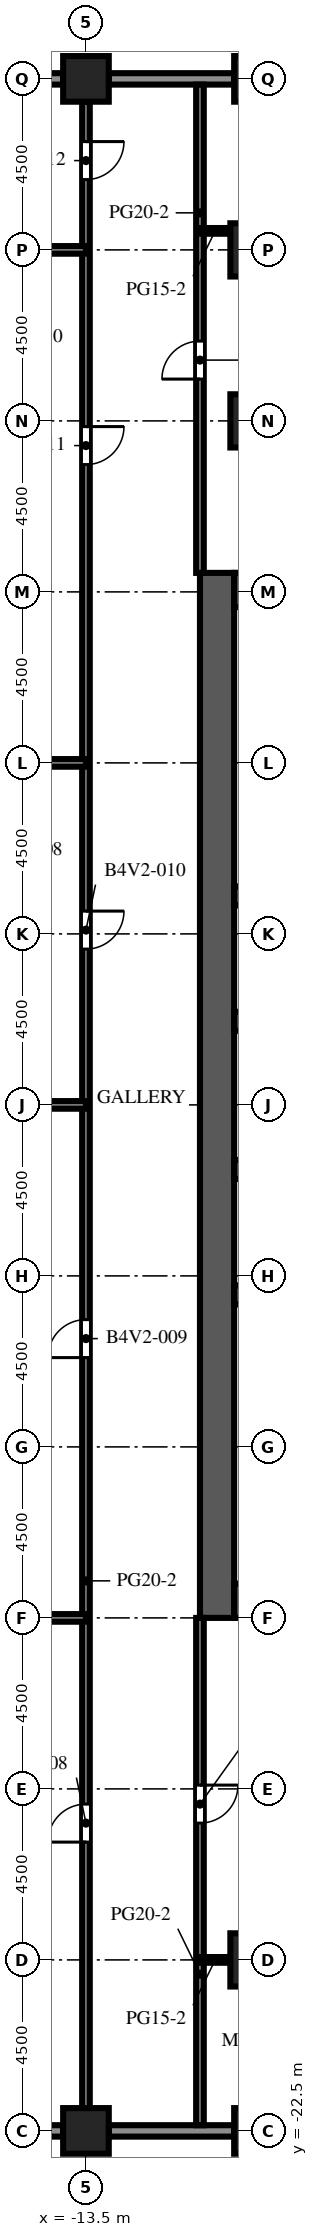
"""IFC4 building model, lengths in metres.
Left out: names, types, materials, properties, quantities, classifications, styles, units other than length and angle.
Written with IfcOpenShell. Run it as: python <this file> out.ifc"""

import sys

from ifc_helpers import new_model, si_unit, direction, frame, frame_2d, origin, origin_2d, place, context, subcontext, project, spatial, rectangle, extrude, element, fill, save


model = new_model("IFC4")
c1 = context("Model", 3, precision=1e-05, world=origin(), true_north=direction((0.0, 1.0)))
c2 = subcontext(c1, "Body", "Model", "MODEL_VIEW")
j1 = project(units=[si_unit("LENGTHUNIT", "METRE"), si_unit("PLANEANGLEUNIT", "RADIAN")], contexts=[c1])
p1 = place(None, origin())
s1 = spatial("IfcSite", under=j1, at=p1, CompositionType="ELEMENT")
p2 = place(p1, origin())
s2 = spatial("IfcBuilding", under=s1, at=p2, CompositionType="ELEMENT")
p3 = place(p2, frame((0.0, 0.0, 141.3)))
s3 = spatial("IfcBuildingStorey", under=s2, at=p3, CompositionType="ELEMENT", Elevation=141.3)
for number, where, z_axis, x_axis in (
    (1, (-13.5, -22.5, 0.0), (0.0, 0.0, 1.0), (1.0, 0.0, 0.0)),
    (2, (-13.5, 31.5, 0.0), (0.0, 0.0, 1.0), (1.0, 0.0, 0.0)),
    (3, (-9.0, -22.5, 0.0), (0.0, 0.0, 1.0), (1.0, 0.0, 0.0)),
    (4, (-9.0, 31.5, 0.0), (0.0, 0.0, 1.0), (1.0, 0.0, 0.0)),
):
    element("IfcColumn", number, at=place(p3, frame(where, z_axis=z_axis, x_axis=x_axis)), inside=s3, PredefinedType="COLUMN", context=c2, shape_type="SweptSolid", body=[
        extrude(rectangle(XDim=1.2, YDim=1.2, at=origin_2d()), origin(), (0.0, 0.0, 1.0), 4.1),
    ])
for number, where, z_axis, x_axis in (
    (5, (-9.0, -18.0, 0.0), (0.0, 0.0, 1.0), (1.0, 0.0, 0.0)),
    (6, (-9.0, 22.5, 0.0), (0.0, 0.0, 1.0), (1.0, 0.0, 0.0)),
    (7, (-9.0, 27.0, 0.0), (0.0, 0.0, 1.0), (1.0, 0.0, 0.0)),
):
    element("IfcColumn", number, at=place(p3, frame(where, z_axis=z_axis, x_axis=x_axis)), inside=s3, PredefinedType="COLUMN", context=c2, shape_type="SweptSolid", body=[
        extrude(rectangle(XDim=1.4, YDim=1.4, at=origin_2d()), origin(), (0.0, 0.0, 1.0), 4.1),
    ])
p4 = place(p3, frame((-10.05, -9.0, 0.0), z_axis=(0.0, 0.0, 1.0), x_axis=(0.0, 1.0, 0.0)))
e8 = element("IfcWall", 8, at=p4, inside=s3, PredefinedType="SHEAR", context=c2, shape_type="SweptSolid", body=[
    extrude(rectangle(XDim=27.5, YDim=0.9, at=frame_2d((13.75, 0.0))), origin(), (0.0, 0.0, 1.0), 4.1),
])
p5 = place(p4, frame((12.55, 0.0, 0.0)))
e9 = element("IfcOpeningElement", 9, at=p5, cuts=e8, PredefinedType="OPENING", context=c2, shape_type="SweptSolid", body=[
    extrude(rectangle(XDim=2.4, YDim=2.4, at=frame_2d((1.2, 1.2))), frame((0.0, 0.46, 0.0), z_axis=(0.0, -1.0, 0.0), x_axis=(1.0, 0.0, 0.0)), (0.0, 0.0, 1.0), 0.92),
])
p6 = place(p4, frame((6.825, 0.0, 0.0)))
e10 = element("IfcOpeningElement", 10, at=p6, cuts=e8, PredefinedType="OPENING", context=c2, shape_type="SweptSolid", body=[
    extrude(rectangle(XDim=1.2, YDim=2.1, at=frame_2d((0.6, 1.05))), frame((0.0, 0.46, 0.0), z_axis=(0.0, -1.0, 0.0), x_axis=(1.0, 0.0, 0.0)), (0.0, 0.0, 1.0), 0.92),
])
p7 = place(p4, frame((19.475, 0.0, 0.0)))
e11 = element("IfcOpeningElement", 11, at=p7, cuts=e8, PredefinedType="OPENING", context=c2, shape_type="SweptSolid", body=[
    extrude(rectangle(XDim=1.2, YDim=2.1, at=frame_2d((0.6, 1.05))), frame((0.0, 0.46, 0.0), z_axis=(0.0, -1.0, 0.0), x_axis=(1.0, 0.0, 0.0)), (0.0, 0.0, 1.0), 0.92),
])
for number, where, z_axis, x_axis in (
    (12, (-9.6, -8.55, 0.0), (0.0, 0.0, 1.0), (1.0, 0.0, 0.0)),
    (13, (-9.6, 18.05, 0.0), (0.0, 0.0, 1.0), (1.0, 0.0, 0.0)),
):
    element("IfcWall", number, at=place(p3, frame(where, z_axis=z_axis, x_axis=x_axis)), inside=s3, PredefinedType="SHEAR", context=c2, shape_type="SweptSolid", body=[
        extrude(rectangle(XDim=10.2, YDim=0.9, at=frame_2d((5.1, 0.0))), origin(), (0.0, 0.0, 1.0), 4.1),
    ])
p8 = place(p3, frame((-9.6, -0.5, 0.0), z_axis=(0.0, 0.0, 1.0), x_axis=(1.0, 0.0, 0.0)))
e14 = element("IfcWall", 14, at=p8, inside=s3, PredefinedType="SHEAR", context=c2, shape_type="SweptSolid", body=[
    extrude(rectangle(XDim=10.2, YDim=0.5, at=frame_2d((5.1, 0.0))), origin(), (0.0, 0.0, 1.0), 4.1),
])
p9 = place(p3, frame((-9.6, 2.8, 0.0), z_axis=(0.0, 0.0, 1.0), x_axis=(1.0, 0.0, 0.0)))
e15 = element("IfcWall", 15, at=p9, inside=s3, PredefinedType="SHEAR", context=c2, shape_type="SweptSolid", body=[
    extrude(rectangle(XDim=10.2, YDim=0.5, at=frame_2d((5.1, 0.0))), origin(), (0.0, 0.0, 1.0), 4.1),
])
p10 = place(p9, frame((0.562, 0.0, 0.0)))
e16 = element("IfcOpeningElement", 16, at=p10, cuts=e15, PredefinedType="OPENING", context=c2, shape_type="SweptSolid", body=[
    extrude(rectangle(XDim=1.1, YDim=2.1, at=frame_2d((0.55, 1.05))), frame((0.0, 0.26, 0.0), z_axis=(0.0, -1.0, 0.0), x_axis=(1.0, 0.0, 0.0)), (0.0, 0.0, 1.0), 0.52),
])
p11 = place(p9, frame((3.238, 0.0, 0.0)))
e17 = element("IfcOpeningElement", 17, at=p11, cuts=e15, PredefinedType="OPENING", context=c2, shape_type="SweptSolid", body=[
    extrude(rectangle(XDim=1.1, YDim=2.1, at=frame_2d((0.55, 1.05))), frame((0.0, 0.26, 0.0), z_axis=(0.0, -1.0, 0.0), x_axis=(1.0, 0.0, 0.0)), (0.0, 0.0, 1.0), 0.52),
])
p12 = place(p9, frame((8.538, 0.0, 0.0)))
e18 = element("IfcOpeningElement", 18, at=p12, cuts=e15, PredefinedType="OPENING", context=c2, shape_type="SweptSolid", body=[
    extrude(rectangle(XDim=1.1, YDim=2.1, at=frame_2d((0.55, 1.05))), frame((0.0, 0.26, 0.0), z_axis=(0.0, -1.0, 0.0), x_axis=(1.0, 0.0, 0.0)), (0.0, 0.0, 1.0), 0.52),
])
p13 = place(p3, frame((-9.6, 6.7, 0.0), z_axis=(0.0, 0.0, 1.0), x_axis=(1.0, 0.0, 0.0)))
e19 = element("IfcWall", 19, at=p13, inside=s3, PredefinedType="SHEAR", context=c2, shape_type="SweptSolid", body=[
    extrude(rectangle(XDim=10.2, YDim=0.5, at=frame_2d((5.1, 0.0))), origin(), (0.0, 0.0, 1.0), 4.1),
])
p14 = place(p13, frame((0.562, 0.0, 0.0)))
e20 = element("IfcOpeningElement", 20, at=p14, cuts=e19, PredefinedType="OPENING", context=c2, shape_type="SweptSolid", body=[
    extrude(rectangle(XDim=1.1, YDim=2.1, at=frame_2d((0.55, 1.05))), frame((0.0, 0.26, 0.0), z_axis=(0.0, -1.0, 0.0), x_axis=(1.0, 0.0, 0.0)), (0.0, 0.0, 1.0), 0.52),
])
p15 = place(p13, frame((3.288, 0.0, 0.0)))
e21 = element("IfcOpeningElement", 21, at=p15, cuts=e19, PredefinedType="OPENING", context=c2, shape_type="SweptSolid", body=[
    extrude(rectangle(XDim=1.0, YDim=2.1, at=frame_2d((0.5, 1.05))), frame((0.0, 0.26, 0.0), z_axis=(0.0, -1.0, 0.0), x_axis=(1.0, 0.0, 0.0)), (0.0, 0.0, 1.0), 0.52),
])
p16 = place(p13, frame((5.913, 0.0, 0.0)))
e22 = element("IfcOpeningElement", 22, at=p16, cuts=e19, PredefinedType="OPENING", context=c2, shape_type="SweptSolid", body=[
    extrude(rectangle(XDim=1.0, YDim=2.1, at=frame_2d((0.5, 1.05))), frame((0.0, 0.26, 0.0), z_axis=(0.0, -1.0, 0.0), x_axis=(1.0, 0.0, 0.0)), (0.0, 0.0, 1.0), 0.52),
])
p17 = place(p13, frame((8.587, 0.0, 0.0)))
e23 = element("IfcOpeningElement", 23, at=p17, cuts=e19, PredefinedType="OPENING", context=c2, shape_type="SweptSolid", body=[
    extrude(rectangle(XDim=1.0, YDim=2.1, at=frame_2d((0.5, 1.05))), frame((0.0, 0.26, 0.0), z_axis=(0.0, -1.0, 0.0), x_axis=(1.0, 0.0, 0.0)), (0.0, 0.0, 1.0), 0.52),
])
p18 = place(p3, frame((-9.6, 10.0, 0.0), z_axis=(0.0, 0.0, 1.0), x_axis=(1.0, 0.0, 0.0)))
e24 = element("IfcWall", 24, at=p18, inside=s3, PredefinedType="SHEAR", context=c2, shape_type="SweptSolid", body=[
    extrude(rectangle(XDim=10.2, YDim=0.5, at=frame_2d((5.1, 0.0))), origin(), (0.0, 0.0, 1.0), 4.1),
])
p19 = place(p3, frame((-14.1, -22.5, 0.0), z_axis=(0.0, 0.0, 1.0), x_axis=(-1.0, 0.0, 0.0)))
e25 = element("IfcWall", 25, at=p19, inside=s3, PredefinedType="SOLIDWALL", context=c2, shape_type="SweptSolid", body=[
    extrude(rectangle(XDim=3.3, YDim=0.3, at=frame_2d((1.65, 0.0))), origin(), (0.0, 0.0, 1.0), 2.6),
])
p20 = place(p19, frame((1.15, 0.0, 0.0)))
e26 = element("IfcOpeningElement", 26, at=p20, cuts=e25, PredefinedType="OPENING", context=c2, shape_type="SweptSolid", body=[
    extrude(rectangle(XDim=1.0, YDim=2.2, at=frame_2d((0.5, 1.1))), frame((0.0, 0.16, 0.0), z_axis=(0.0, -1.0, 0.0), x_axis=(1.0, 0.0, 0.0)), (0.0, 0.0, 1.0), 0.32),
])
for number, where, z_axis, x_axis in (
    (27, (-9.6, -22.5, 0.0), (0.0, 0.0, 1.0), (-1.0, 0.0, 0.0)),
    (28, (-12.9, 31.5, 0.0), (0.0, 0.0, 1.0), (1.0, 0.0, 0.0)),
):
    element("IfcWall", number, at=place(p3, frame(where, z_axis=z_axis, x_axis=x_axis)), inside=s3, PredefinedType="SOLIDWALL", context=c2, shape_type="SweptSolid", body=[
        extrude(rectangle(XDim=3.3, YDim=0.3, at=frame_2d((1.65, 0.0))), origin(), (0.0, 0.0, 1.0), 2.6),
    ])
p21 = place(p3, frame((-17.4, 31.5, 0.0), z_axis=(0.0, 0.0, 1.0), x_axis=(1.0, 0.0, 0.0)))
e29 = element("IfcWall", 29, at=p21, inside=s3, PredefinedType="SOLIDWALL", context=c2, shape_type="SweptSolid", body=[
    extrude(rectangle(XDim=3.3, YDim=0.3, at=frame_2d((1.65, 0.0))), origin(), (0.0, 0.0, 1.0), 2.6),
])
p22 = place(p21, frame((1.15, 0.0, 0.0)))
e30 = element("IfcOpeningElement", 30, at=p22, cuts=e29, PredefinedType="OPENING", context=c2, shape_type="SweptSolid", body=[
    extrude(rectangle(XDim=1.0, YDim=2.2, at=frame_2d((0.5, 1.1))), frame((0.0, 0.16, 0.0), z_axis=(0.0, -1.0, 0.0), x_axis=(1.0, 0.0, 0.0)), (0.0, 0.0, 1.0), 0.32),
])
p23 = place(p3, frame((-13.5, -21.9, 0.0), z_axis=(0.0, 0.0, 1.0), x_axis=(0.0, 1.0, 0.0)))
e31 = element("IfcWall", 31, at=p23, inside=s3, PredefinedType="PARTITIONING", context=c2, shape_type="SweptSolid", body=[
    extrude(rectangle(XDim=52.8, YDim=0.2, at=frame_2d((26.4, 0.0))), origin(), (0.0, 0.0, 1.0), 3.5),
])
p24 = place(p23, frame((7.0, 0.0, 0.0)))
e32 = element("IfcOpeningElement", 32, at=p24, cuts=e31, PredefinedType="OPENING", context=c2, shape_type="SweptSolid", body=[
    extrude(rectangle(XDim=1.0, YDim=2.1, at=frame_2d((0.5, 1.05))), frame((0.0, 0.11, 0.0), z_axis=(0.0, -1.0, 0.0), x_axis=(1.0, 0.0, 0.0)), (0.0, 0.0, 1.0), 0.22),
])
p25 = place(p23, frame((19.75, 0.0, 0.0)))
e33 = element("IfcOpeningElement", 33, at=p25, cuts=e31, PredefinedType="OPENING", context=c2, shape_type="SweptSolid", body=[
    extrude(rectangle(XDim=1.0, YDim=2.1, at=frame_2d((0.5, 1.05))), frame((0.0, 0.11, 0.0), z_axis=(0.0, -1.0, 0.0), x_axis=(1.0, 0.0, 0.0)), (0.0, 0.0, 1.0), 0.22),
])
p26 = place(p23, frame((30.5, 0.0, 0.0)))
e34 = element("IfcOpeningElement", 34, at=p26, cuts=e31, PredefinedType="OPENING", context=c2, shape_type="SweptSolid", body=[
    extrude(rectangle(XDim=1.0, YDim=2.1, at=frame_2d((0.5, 1.05))), frame((0.0, 0.11, 0.0), z_axis=(0.0, -1.0, 0.0), x_axis=(1.0, 0.0, 0.0)), (0.0, 0.0, 1.0), 0.22),
])
p27 = place(p23, frame((43.25, 0.0, 0.0)))
e35 = element("IfcOpeningElement", 35, at=p27, cuts=e31, PredefinedType="OPENING", context=c2, shape_type="SweptSolid", body=[
    extrude(rectangle(XDim=1.0, YDim=2.1, at=frame_2d((0.5, 1.05))), frame((0.0, 0.11, 0.0), z_axis=(0.0, -1.0, 0.0), x_axis=(1.0, 0.0, 0.0)), (0.0, 0.0, 1.0), 0.22),
])
p28 = place(p23, frame((50.75, 0.0, 0.0)))
e36 = element("IfcOpeningElement", 36, at=p28, cuts=e31, PredefinedType="OPENING", context=c2, shape_type="SweptSolid", body=[
    extrude(rectangle(XDim=1.0, YDim=2.1, at=frame_2d((0.5, 1.05))), frame((0.0, 0.11, 0.0), z_axis=(0.0, -1.0, 0.0), x_axis=(1.0, 0.0, 0.0)), (0.0, 0.0, 1.0), 0.22),
])
p29 = place(p3, frame((-10.5, -9.0, 0.0), z_axis=(0.0, 0.0, 1.0), x_axis=(0.0, -1.0, 0.0)))
e37 = element("IfcWall", 37, at=p29, inside=s3, PredefinedType="PARTITIONING", context=c2, shape_type="SweptSolid", body=[
    extrude(rectangle(XDim=13.35, YDim=0.2, at=frame_2d((6.675, 0.0))), origin(), (0.0, 0.0, 1.0), 3.5),
])
p30 = place(p29, frame((4.4, 0.0, 0.0)))
e38 = element("IfcOpeningElement", 38, at=p30, cuts=e37, PredefinedType="OPENING", context=c2, shape_type="SweptSolid", body=[
    extrude(rectangle(XDim=1.0, YDim=2.1, at=frame_2d((0.5, 1.05))), frame((0.0, 0.11, 0.0), z_axis=(0.0, -1.0, 0.0), x_axis=(1.0, 0.0, 0.0)), (0.0, 0.0, 1.0), 0.22),
])
p31 = place(p3, frame((-10.5, 31.35, 0.0), z_axis=(0.0, 0.0, 1.0), x_axis=(0.0, -1.0, 0.0)))
e39 = element("IfcWall", 39, at=p31, inside=s3, PredefinedType="PARTITIONING", context=c2, shape_type="SweptSolid", body=[
    extrude(rectangle(XDim=12.85, YDim=0.2, at=frame_2d((6.425, 0.0))), origin(), (0.0, 0.0, 1.0), 3.5),
])
p32 = place(p31, frame((6.75, 0.0, 0.0)))
e40 = element("IfcOpeningElement", 40, at=p32, cuts=e39, PredefinedType="OPENING", context=c2, shape_type="SweptSolid", body=[
    extrude(rectangle(XDim=1.0, YDim=2.1, at=frame_2d((0.5, 1.05))), frame((0.0, 0.11, 0.0), z_axis=(0.0, -1.0, 0.0), x_axis=(1.0, 0.0, 0.0)), (0.0, 0.0, 1.0), 0.22),
])
p33 = place(p3, frame((-10.5, -18.0, 0.0), z_axis=(0.0, 0.0, 1.0), x_axis=(1.0, 0.0, 0.0)))
e41 = element("IfcWall", 41, at=p33, inside=s3, PredefinedType="PARTITIONING", context=c2, shape_type="SweptSolid", body=[
    extrude(rectangle(XDim=0.8, YDim=0.15, at=frame_2d((0.4, 0.0))), origin(), (0.0, 0.0, 1.0), 3.5),
])
p34 = place(p3, frame((-17.3, -9.0, 0.0), z_axis=(0.0, 0.0, 1.0), x_axis=(1.0, 0.0, 0.0)))
e42 = element("IfcWall", 42, at=p34, inside=s3, PredefinedType="PARTITIONING", context=c2, shape_type="SweptSolid", body=[
    extrude(rectangle(XDim=3.8, YDim=0.2, at=frame_2d((1.9, 0.0))), origin(), (0.0, 0.0, 1.0), 3.5),
])
for number, where, z_axis, x_axis in (
    (43, (-26.4, 4.5, 0.0), (0.0, 0.0, 1.0), (1.0, 0.0, 0.0)),
    (44, (-26.4, 13.5, 0.0), (0.0, 0.0, 1.0), (1.0, 0.0, 0.0)),
):
    element("IfcWall", number, at=place(p3, frame(where, z_axis=z_axis, x_axis=x_axis)), inside=s3, PredefinedType="PARTITIONING", context=c2, shape_type="SweptSolid", body=[
        extrude(rectangle(XDim=12.9, YDim=0.2, at=frame_2d((6.45, 0.0))), origin(), (0.0, 0.0, 1.0), 3.5),
    ])
p35 = place(p3, frame((-17.3, 27.0, 0.0), z_axis=(0.0, 0.0, 1.0), x_axis=(1.0, 0.0, 0.0)))
e45 = element("IfcWall", 45, at=p35, inside=s3, PredefinedType="PARTITIONING", context=c2, shape_type="SweptSolid", body=[
    extrude(rectangle(XDim=3.8, YDim=0.2, at=frame_2d((1.9, 0.0))), origin(), (0.0, 0.0, 1.0), 3.5),
])
p36 = place(p3, frame((-10.5, 27.5, 0.0), z_axis=(0.0, 0.0, 1.0), x_axis=(1.0, 0.0, 0.0)))
e46 = element("IfcWall", 46, at=p36, inside=s3, PredefinedType="PARTITIONING", context=c2, shape_type="SweptSolid", body=[
    extrude(rectangle(XDim=0.8, YDim=0.15, at=frame_2d((0.4, 0.0))), origin(), (0.0, 0.0, 1.0), 3.5),
])
p37 = place(p5, origin())
e47 = element("IfcDoor", 47, at=p37, inside=s3, OperationType="DOUBLE_DOOR_DOUBLE_SWING", PredefinedType="DOOR", context=c2, shape_type="SweptSolid", body=[
    extrude(rectangle(XDim=2.4, YDim=2.4, at=frame_2d((1.2, 1.2))), frame((0.0, 0.025, 0.0), z_axis=(0.0, -1.0, 0.0), x_axis=(1.0, 0.0, 0.0)), (0.0, 0.0, 1.0), 0.05),
])
fill(e9, e47)
p38 = place(p6, origin())
e48 = element("IfcDoor", 48, at=p38, inside=s3, OperationType="SINGLE_SWING_LEFT", PredefinedType="DOOR", context=c2, shape_type="SweptSolid", body=[
    extrude(rectangle(XDim=1.2, YDim=2.1, at=frame_2d((0.6, 1.05))), frame((0.0, 0.025, 0.0), z_axis=(0.0, -1.0, 0.0), x_axis=(1.0, 0.0, 0.0)), (0.0, 0.0, 1.0), 0.05),
])
fill(e10, e48)
p39 = place(p7, origin())
e49 = element("IfcDoor", 49, at=p39, inside=s3, OperationType="SINGLE_SWING_LEFT", PredefinedType="DOOR", context=c2, shape_type="SweptSolid", body=[
    extrude(rectangle(XDim=1.2, YDim=2.1, at=frame_2d((0.6, 1.05))), frame((0.0, 0.025, 0.0), z_axis=(0.0, -1.0, 0.0), x_axis=(1.0, 0.0, 0.0)), (0.0, 0.0, 1.0), 0.05),
])
fill(e11, e49)
p40 = place(p24, origin())
e50 = element("IfcDoor", 50, at=p40, inside=s3, OperationType="SINGLE_SWING_LEFT", PredefinedType="DOOR", context=c2, shape_type="SweptSolid", body=[
    extrude(rectangle(XDim=1.0, YDim=2.1, at=frame_2d((0.5, 1.05))), frame((0.0, 0.025, 0.0), z_axis=(0.0, -1.0, 0.0), x_axis=(1.0, 0.0, 0.0)), (0.0, 0.0, 1.0), 0.05),
])
fill(e32, e50)
p41 = place(p25, origin())
e51 = element("IfcDoor", 51, at=p41, inside=s3, OperationType="SINGLE_SWING_LEFT", PredefinedType="DOOR", context=c2, shape_type="SweptSolid", body=[
    extrude(rectangle(XDim=1.0, YDim=2.1, at=frame_2d((0.5, 1.05))), frame((0.0, 0.025, 0.0), z_axis=(0.0, -1.0, 0.0), x_axis=(1.0, 0.0, 0.0)), (0.0, 0.0, 1.0), 0.05),
])
fill(e33, e51)
p42 = place(p26, origin())
e52 = element("IfcDoor", 52, at=p42, inside=s3, OperationType="SINGLE_SWING_RIGHT", PredefinedType="DOOR", context=c2, shape_type="SweptSolid", body=[
    extrude(rectangle(XDim=1.0, YDim=2.1, at=frame_2d((0.5, 1.05))), frame((0.0, 0.025, 0.0), z_axis=(0.0, -1.0, 0.0), x_axis=(1.0, 0.0, 0.0)), (0.0, 0.0, 1.0), 0.05),
])
fill(e34, e52)
p43 = place(p27, origin())
e53 = element("IfcDoor", 53, at=p43, inside=s3, OperationType="SINGLE_SWING_RIGHT", PredefinedType="DOOR", context=c2, shape_type="SweptSolid", body=[
    extrude(rectangle(XDim=1.0, YDim=2.1, at=frame_2d((0.5, 1.05))), frame((0.0, 0.025, 0.0), z_axis=(0.0, -1.0, 0.0), x_axis=(1.0, 0.0, 0.0)), (0.0, 0.0, 1.0), 0.05),
])
fill(e35, e53)
p44 = place(p28, origin())
e54 = element("IfcDoor", 54, at=p44, inside=s3, OperationType="SINGLE_SWING_RIGHT", PredefinedType="DOOR", context=c2, shape_type="SweptSolid", body=[
    extrude(rectangle(XDim=1.0, YDim=2.1, at=frame_2d((0.5, 1.05))), frame((0.0, 0.025, 0.0), z_axis=(0.0, -1.0, 0.0), x_axis=(1.0, 0.0, 0.0)), (0.0, 0.0, 1.0), 0.05),
])
fill(e36, e54)
p45 = place(p30, origin())
e55 = element("IfcDoor", 55, at=p45, inside=s3, OperationType="SINGLE_SWING_LEFT", PredefinedType="DOOR", context=c2, shape_type="SweptSolid", body=[
    extrude(rectangle(XDim=1.0, YDim=2.1, at=frame_2d((0.5, 1.05))), frame((0.0, 0.025, 0.0), z_axis=(0.0, -1.0, 0.0), x_axis=(1.0, 0.0, 0.0)), (0.0, 0.0, 1.0), 0.05),
])
fill(e38, e55)
p46 = place(p32, origin())
e56 = element("IfcDoor", 56, at=p46, inside=s3, OperationType="SINGLE_SWING_RIGHT", PredefinedType="DOOR", context=c2, shape_type="SweptSolid", body=[
    extrude(rectangle(XDim=1.0, YDim=2.1, at=frame_2d((0.5, 1.05))), frame((0.0, 0.025, 0.0), z_axis=(0.0, -1.0, 0.0), x_axis=(1.0, 0.0, 0.0)), (0.0, 0.0, 1.0), 0.05),
])
fill(e40, e56)
save(model, sys.argv[1])
